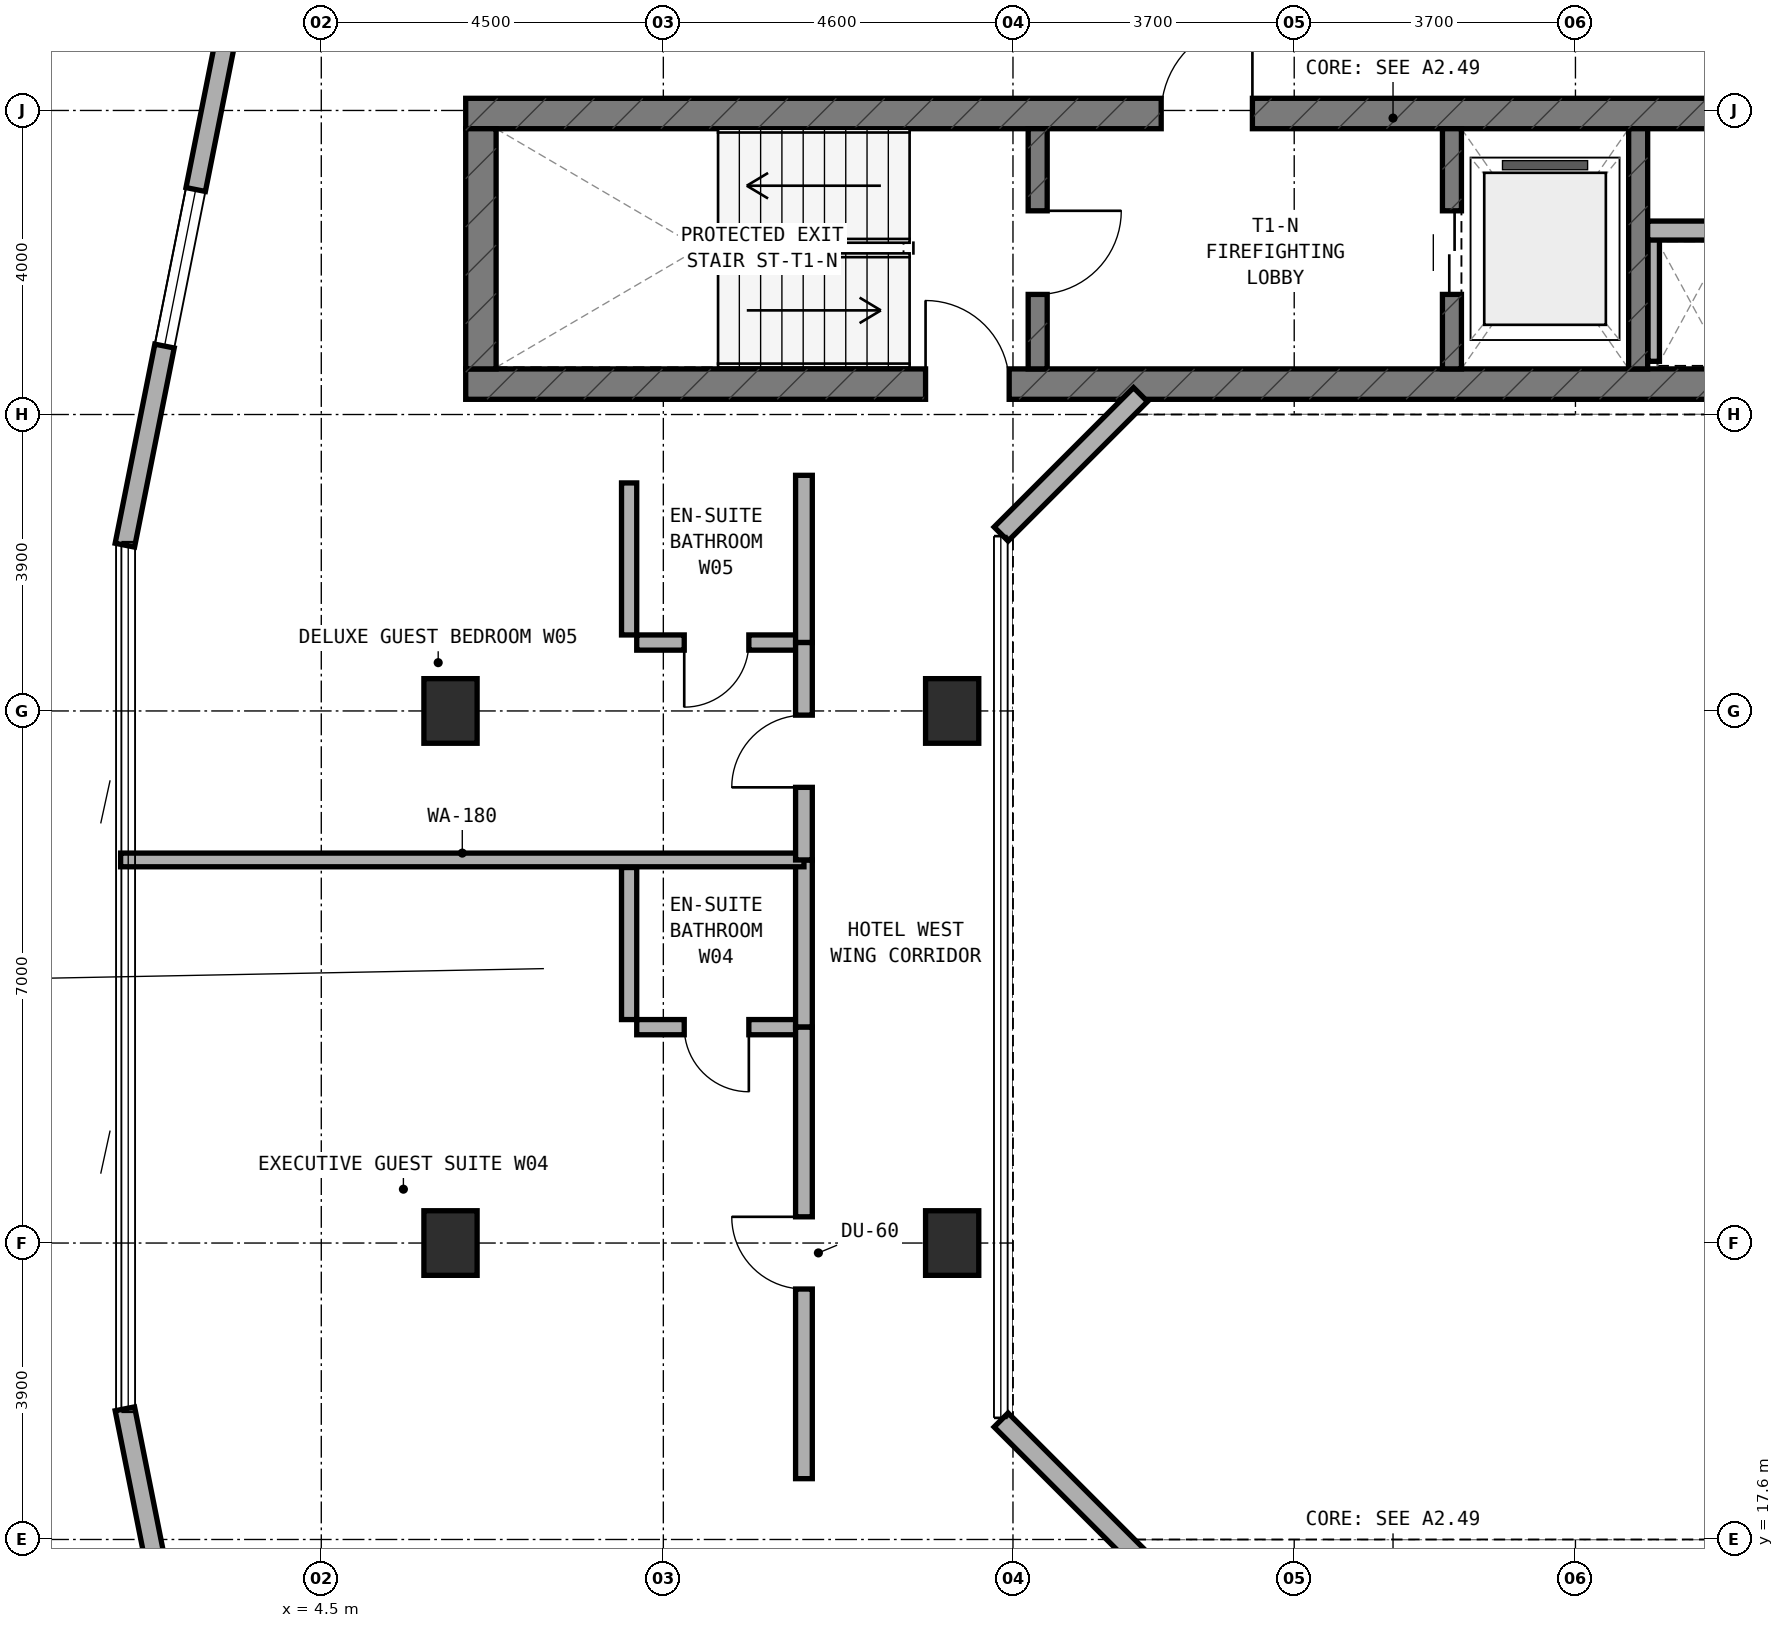
"""IFC4 building model, lengths in metres.
Left out: names, types, materials, properties, quantities, classifications, styles, units other than length and angle.
Written with IfcOpenShell. Run it as: python <this file> out.ifc"""

import sys

from ifc_helpers import new_model, si_unit, direction, frame, frame_2d, origin, origin_2d, place, context, subcontext, project, spatial, rectangle, extrude, element, fill, save


model = new_model("IFC4")
c1 = context("Model", 3, precision=1e-05, world=origin(), true_north=direction((0.0, 1.0)))
c2 = subcontext(c1, "Body", "Model", "MODEL_VIEW")
j1 = project(units=[si_unit("LENGTHUNIT", "METRE"), si_unit("PLANEANGLEUNIT", "RADIAN")], contexts=[c1])
p1 = place(None, origin())
s1 = spatial("IfcSite", under=j1, at=p1, CompositionType="ELEMENT")
p2 = place(p1, origin())
s2 = spatial("IfcBuilding", under=s1, at=p2, CompositionType="ELEMENT")
p3 = place(p2, frame((0.0, 0.0, 231.5)))
s3 = spatial("IfcBuildingStorey", under=s2, at=p3, CompositionType="ELEMENT", Elevation=231.5)
p4 = place(p3, frame((6.4, 32.8, 0.0), z_axis=(0.0, 0.0, 1.0), x_axis=(1.0, 0.0, 0.0)))
e1 = element("IfcWall", 1, at=p4, inside=s3, PredefinedType="SHEAR", context=c2, shape_type="SweptSolid", body=[
    extrude(rectangle(XDim=24.4, YDim=0.4, at=frame_2d((12.2, 0.0))), origin(), (0.0, 0.0, 1.0), 3.6),
])
p5 = place(p4, frame((6.05, 0.0, 0.0)))
e2 = element("IfcOpeningElement", 2, at=p5, cuts=e1, PredefinedType="OPENING", context=c2, shape_type="SweptSolid", body=[
    extrude(rectangle(XDim=1.1, YDim=2.15, at=frame_2d((0.55, 1.075))), frame((0.0, 0.21, 0.0), z_axis=(0.0, -1.0, 0.0), x_axis=(1.0, 0.0, 0.0)), (0.0, 0.0, 1.0), 0.42),
])
p6 = place(p3, frame((6.4, 36.36, 0.0), z_axis=(0.0, 0.0, 1.0), x_axis=(1.0, 0.0, 0.0)))
e3 = element("IfcWall", 3, at=p6, inside=s3, PredefinedType="SHEAR", context=c2, shape_type="SweptSolid", body=[
    extrude(rectangle(XDim=24.4, YDim=0.4, at=frame_2d((12.2, 0.0))), origin(), (0.0, 0.0, 1.0), 3.6),
])
p7 = place(p6, frame((9.15, 0.0, 0.0)))
e4 = element("IfcOpeningElement", 4, at=p7, cuts=e3, PredefinedType="OPENING", context=c2, shape_type="SweptSolid", body=[
    extrude(rectangle(XDim=1.2, YDim=2.15, at=frame_2d((0.6, 1.075))), frame((0.0, 0.21, 0.0), z_axis=(0.0, -1.0, 0.0), x_axis=(1.0, 0.0, 0.0)), (0.0, 0.0, 1.0), 0.42),
])
p8 = place(p6, frame((19.2, 0.0, 0.0)))
e5 = element("IfcOpeningElement", 5, at=p8, cuts=e3, PredefinedType="OPENING", context=c2, shape_type="SweptSolid", body=[
    extrude(rectangle(XDim=0.85, YDim=2.1, at=frame_2d((0.425, 1.05))), frame((0.0, 0.21, 0.0), z_axis=(0.0, -1.0, 0.0), x_axis=(1.0, 0.0, 0.0)), (0.0, 0.0, 1.0), 0.42),
])
p9 = place(p6, frame((17.22, 0.0, 0.0)))
e6 = element("IfcOpeningElement", 6, at=p9, cuts=e3, PredefinedType="OPENING", context=c2, shape_type="SweptSolid", body=[
    extrude(rectangle(XDim=0.85, YDim=2.1, at=frame_2d((0.425, 1.05))), frame((0.0, 0.21, 0.0), z_axis=(0.0, -1.0, 0.0), x_axis=(1.0, 0.0, 0.0)), (0.0, 0.0, 1.0), 0.42),
])
p10 = place(p3, frame((6.6, 33.0, 0.0), z_axis=(0.0, 0.0, 1.0), x_axis=(0.0, 1.0, 0.0)))
e7 = element("IfcWall", 7, at=p10, inside=s3, PredefinedType="SHEAR", context=c2, shape_type="SweptSolid", body=[
    extrude(rectangle(XDim=3.16, YDim=0.4, at=frame_2d((1.58, 0.0))), origin(), (0.0, 0.0, 1.0), 3.6),
])
p11 = place(p3, frame((13.925, 33.0, 0.0), z_axis=(0.0, 0.0, 1.0), x_axis=(0.0, 1.0, 0.0)))
e8 = element("IfcWall", 8, at=p11, inside=s3, PredefinedType="STANDARD", context=c2, shape_type="SweptSolid", body=[
    extrude(rectangle(XDim=3.16, YDim=0.25, at=frame_2d((1.58, 0.0))), origin(), (0.0, 0.0, 1.0), 3.32),
])
p12 = place(p11, frame((0.98, 0.0, 0.0)))
e9 = element("IfcOpeningElement", 9, at=p12, cuts=e8, PredefinedType="OPENING", context=c2, shape_type="SweptSolid", body=[
    extrude(rectangle(XDim=1.1, YDim=2.15, at=frame_2d((0.55, 1.075))), frame((0.0, 0.135, 0.0), z_axis=(0.0, -1.0, 0.0), x_axis=(1.0, 0.0, 0.0)), (0.0, 0.0, 1.0), 0.27),
])
p13 = place(p3, frame((19.375, 33.0, 0.0), z_axis=(0.0, 0.0, 1.0), x_axis=(0.0, 1.0, 0.0)))
e10 = element("IfcWall", 10, at=p13, inside=s3, PredefinedType="STANDARD", context=c2, shape_type="SweptSolid", body=[
    extrude(rectangle(XDim=3.16, YDim=0.25, at=frame_2d((1.58, 0.0))), origin(), (0.0, 0.0, 1.0), 3.32),
])
p14 = place(p13, frame((0.98, 0.0, 0.0)))
e11 = element("IfcOpeningElement", 11, at=p14, cuts=e10, PredefinedType="OPENING", context=c2, shape_type="SweptSolid", body=[
    extrude(rectangle(XDim=1.1, YDim=2.15, at=frame_2d((0.55, 1.075))), frame((0.0, 0.135, 0.0), z_axis=(0.0, -1.0, 0.0), x_axis=(1.0, 0.0, 0.0)), (0.0, 0.0, 1.0), 0.27),
])
p15 = place(p3, frame((21.825, 33.0, 0.0), z_axis=(0.0, 0.0, 1.0), x_axis=(0.0, 1.0, 0.0)))
e12 = element("IfcWall", 12, at=p15, inside=s3, PredefinedType="STANDARD", context=c2, shape_type="SweptSolid", body=[
    extrude(rectangle(XDim=3.16, YDim=0.25, at=frame_2d((1.58, 0.0))), origin(), (0.0, 0.0, 1.0), 3.32),
])
for number, where, z_axis, x_axis in (
    (13, (6.2, 21.5, 0.0), (0.0, 0.0, 1.0), (1.0, 0.0, 0.0)),
    (14, (6.2, 28.5, 0.0), (0.0, 0.0, 1.0), (1.0, 0.0, 0.0)),
    (15, (12.8, 21.5, 0.0), (0.0, 0.0, 1.0), (1.0, 0.0, 0.0)),
    (16, (12.8, 28.5, 0.0), (0.0, 0.0, 1.0), (1.0, 0.0, 0.0)),
):
    element("IfcColumn", number, at=place(p3, frame(where, z_axis=z_axis, x_axis=x_axis)), inside=s3, PredefinedType="COLUMN", context=c2, shape_type="SweptSolid", body=[
        extrude(rectangle(XDim=0.7, YDim=0.85, at=origin_2d()), origin(), (0.0, 0.0, 1.0), 3.6),
    ])
p16 = place(p3, frame((3.629, 39.283, 0.0), z_axis=(0.0, 0.0, 1.0), x_axis=(-0.195291715883, -0.980745199176, 0.0)))
e17 = element("IfcWall", 17, at=p16, inside=s3, PredefinedType="STANDARD", context=c2, shape_type="SweptSolid", body=[
    extrude(rectangle(XDim=8.771, YDim=0.26, at=frame_2d((4.385, 0.0))), origin(), (0.0, 0.0, 1.0), 3.32),
])
p17 = place(p16, frame((4.0, 0.0, 0.85)))
e18 = element("IfcOpeningElement", 18, at=p17, cuts=e17, PredefinedType="OPENING", context=c2, shape_type="SweptSolid", body=[
    extrude(rectangle(XDim=2.1, YDim=1.5, at=frame_2d((1.05, 0.75))), frame((0.0, 0.14, 0.0), z_axis=(0.0, -1.0, 0.0), x_axis=(1.0, 0.0, 0.0)), (0.0, 0.0, 1.0), 0.28),
])
p18 = place(p3, frame((1.916, 19.319, 0.0), z_axis=(0.0, 0.0, 1.0), x_axis=(0.195291715883, -0.980745199176, 0.0)))
e19 = element("IfcWall", 19, at=p18, inside=s3, PredefinedType="STANDARD", context=c2, shape_type="SweptSolid", body=[
    extrude(rectangle(XDim=8.771, YDim=0.26, at=frame_2d((4.385, 0.0))), origin(), (0.0, 0.0, 1.0), 3.32),
])
p19 = place(p18, frame((2.67, 0.0, 0.85)))
e20 = element("IfcOpeningElement", 20, at=p19, cuts=e19, PredefinedType="OPENING", context=c2, shape_type="SweptSolid", body=[
    extrude(rectangle(XDim=2.1, YDim=1.5, at=frame_2d((1.05, 0.75))), frame((0.0, 0.14, 0.0), z_axis=(0.0, -1.0, 0.0), x_axis=(1.0, 0.0, 0.0)), (0.0, 0.0, 1.0), 0.28),
])
for number, where, z_axis, x_axis in (
    (21, (15.278, 32.662, 0.0), (0.0, 0.0, 1.0), (-0.707, -0.707, 0.0)),
    (22, (13.444, 19.172, 0.0), (0.0, 0.0, 1.0), (0.707, -0.707, 0.0)),
):
    element("IfcWall", number, at=place(p3, frame(where, z_axis=z_axis, x_axis=x_axis)), inside=s3, PredefinedType="STANDARD", context=c2, shape_type="SweptSolid", body=[
        extrude(rectangle(XDim=2.594, YDim=0.26, at=frame_2d((1.297, 0.0))), origin(), (0.0, 0.0, 1.0), 3.32),
    ])
p20 = place(p3, frame((22.03, 33.1, 0.0), z_axis=(0.0, 0.0, 1.0), x_axis=(0.0, 1.0, 0.0)))
e23 = element("IfcWall", 23, at=p20, inside=s3, PredefinedType="PARTITIONING", context=c2, shape_type="SweptSolid", body=[
    extrude(rectangle(XDim=1.62, YDim=0.15, at=frame_2d((0.81, 0.0))), origin(), (0.0, 0.0, 1.0), 3.32),
])
p21 = place(p3, frame((21.95, 34.82, 0.0), z_axis=(0.0, 0.0, 1.0), x_axis=(1.0, 0.0, 0.0)))
e24 = element("IfcWall", 24, at=p21, inside=s3, PredefinedType="SOLIDWALL", context=c2, shape_type="SweptSolid", body=[
    extrude(rectangle(XDim=1.15, YDim=0.25, at=frame_2d((0.575, 0.0))), origin(), (0.0, 0.0, 1.0), 3.32),
])
p22 = place(p3, frame((8.65, 24.34, 0.0), z_axis=(0.0, 0.0, 1.0), x_axis=(1.0, 0.0, 0.0)))
e25 = element("IfcWall", 25, at=p22, inside=s3, PredefinedType="PLUMBINGWALL", context=c2, shape_type="SweptSolid", body=[
    extrude(rectangle(XDim=2.1, YDim=0.2, at=frame_2d((1.05, 0.0))), origin(), (0.0, 0.0, 1.0), 3.32),
])
p23 = place(p22, frame((0.625, 0.0, 0.0)))
e26 = element("IfcOpeningElement", 26, at=p23, cuts=e25, PredefinedType="OPENING", context=c2, shape_type="SweptSolid", body=[
    extrude(rectangle(XDim=0.85, YDim=2.1, at=frame_2d((0.425, 1.05))), frame((0.0, 0.11, 0.0), z_axis=(0.0, -1.0, 0.0), x_axis=(1.0, 0.0, 0.0)), (0.0, 0.0, 1.0), 0.22),
])
p24 = place(p3, frame((8.55, 24.44, 0.0), z_axis=(0.0, 0.0, 1.0), x_axis=(0.0, 1.0, 0.0)))
e27 = element("IfcWall", 27, at=p24, inside=s3, PredefinedType="PLUMBINGWALL", context=c2, shape_type="SweptSolid", body=[
    extrude(rectangle(XDim=2.0, YDim=0.2, at=frame_2d((1.0, 0.0))), origin(), (0.0, 0.0, 1.0), 3.32),
])
p25 = place(p3, frame((10.85, 24.34, 0.0), z_axis=(0.0, 0.0, 1.0), x_axis=(0.0, 1.0, 0.0)))
e28 = element("IfcWall", 28, at=p25, inside=s3, PredefinedType="SOLIDWALL", context=c2, shape_type="SweptSolid", body=[
    extrude(rectangle(XDim=2.2, YDim=0.22, at=frame_2d((1.1, 0.0))), origin(), (0.0, 0.0, 1.0), 3.32),
])
p26 = place(p3, frame((10.85, 18.4, 0.0), z_axis=(0.0, 0.0, 1.0), x_axis=(0.0, 1.0, 0.0)))
e29 = element("IfcWall", 29, at=p26, inside=s3, PredefinedType="SOLIDWALL", context=c2, shape_type="SweptSolid", body=[
    extrude(rectangle(XDim=5.94, YDim=0.22, at=frame_2d((2.97, 0.0))), origin(), (0.0, 0.0, 1.0), 2.745),
])
p27 = place(p26, frame((2.495, 0.0, 0.0)))
e30 = element("IfcOpeningElement", 30, at=p27, cuts=e29, PredefinedType="OPENING", context=c2, shape_type="SweptSolid", body=[
    extrude(rectangle(XDim=0.95, YDim=2.1, at=frame_2d((0.475, 1.05))), frame((0.0, 0.12, 0.0), z_axis=(0.0, -1.0, 0.0), x_axis=(1.0, 0.0, 0.0)), (0.0, 0.0, 1.0), 0.24),
])
p28 = place(p3, frame((1.86, 26.54, 0.0), z_axis=(0.0, 0.0, 1.0), x_axis=(1.0, 0.0, 0.0)))
e31 = element("IfcWall", 31, at=p28, inside=s3, PredefinedType="SOLIDWALL", context=c2, shape_type="SweptSolid", body=[
    extrude(rectangle(XDim=8.99, YDim=0.18, at=frame_2d((4.495, 0.0))), origin(), (0.0, 0.0, 1.0), 3.015),
])
p29 = place(p3, frame((8.65, 29.4, 0.0), z_axis=(0.0, 0.0, 1.0), x_axis=(1.0, 0.0, 0.0)))
e32 = element("IfcWall", 32, at=p29, inside=s3, PredefinedType="PLUMBINGWALL", context=c2, shape_type="SweptSolid", body=[
    extrude(rectangle(XDim=2.1, YDim=0.2, at=frame_2d((1.05, 0.0))), origin(), (0.0, 0.0, 1.0), 3.32),
])
p30 = place(p29, frame((0.625, 0.0, 0.0)))
e33 = element("IfcOpeningElement", 33, at=p30, cuts=e32, PredefinedType="OPENING", context=c2, shape_type="SweptSolid", body=[
    extrude(rectangle(XDim=0.85, YDim=2.1, at=frame_2d((0.425, 1.05))), frame((0.0, 0.11, 0.0), z_axis=(0.0, -1.0, 0.0), x_axis=(1.0, 0.0, 0.0)), (0.0, 0.0, 1.0), 0.22),
])
p31 = place(p3, frame((8.55, 29.5, 0.0), z_axis=(0.0, 0.0, 1.0), x_axis=(0.0, 1.0, 0.0)))
e34 = element("IfcWall", 34, at=p31, inside=s3, PredefinedType="PLUMBINGWALL", context=c2, shape_type="SweptSolid", body=[
    extrude(rectangle(XDim=2.0, YDim=0.2, at=frame_2d((1.0, 0.0))), origin(), (0.0, 0.0, 1.0), 3.32),
])
p32 = place(p3, frame((10.85, 29.4, 0.0), z_axis=(0.0, 0.0, 1.0), x_axis=(0.0, 1.0, 0.0)))
e35 = element("IfcWall", 35, at=p32, inside=s3, PredefinedType="SOLIDWALL", context=c2, shape_type="SweptSolid", body=[
    extrude(rectangle(XDim=2.2, YDim=0.22, at=frame_2d((1.1, 0.0))), origin(), (0.0, 0.0, 1.0), 3.32),
])
p33 = place(p3, frame((10.85, 26.54, 0.0), z_axis=(0.0, 0.0, 1.0), x_axis=(0.0, 1.0, 0.0)))
e36 = element("IfcWall", 36, at=p33, inside=s3, PredefinedType="SOLIDWALL", context=c2, shape_type="SweptSolid", body=[
    extrude(rectangle(XDim=2.86, YDim=0.22, at=frame_2d((1.43, 0.0))), origin(), (0.0, 0.0, 1.0), 2.745),
])
p34 = place(p33, frame((0.955, 0.0, 0.0)))
e37 = element("IfcOpeningElement", 37, at=p34, cuts=e36, PredefinedType="OPENING", context=c2, shape_type="SweptSolid", body=[
    extrude(rectangle(XDim=0.95, YDim=2.1, at=frame_2d((0.475, 1.05))), frame((0.0, 0.12, 0.0), z_axis=(0.0, -1.0, 0.0), x_axis=(1.0, 0.0, 0.0)), (0.0, 0.0, 1.0), 0.24),
])
p35 = place(p17, origin())
e38 = element("IfcWindow", 38, at=p35, inside=s3, PartitioningType="SINGLE_PANEL", PredefinedType="WINDOW", context=c2, shape_type="SweptSolid", body=[
    extrude(rectangle(XDim=2.1, YDim=1.5, at=frame_2d((1.05, 0.75))), frame((0.0, 0.03, 0.0), z_axis=(0.0, -1.0, 0.0), x_axis=(1.0, 0.0, 0.0)), (0.0, 0.0, 1.0), 0.06),
])
fill(e18, e38)
p36 = place(p12, frame((1.1, 0.0, 0.0), z_axis=(0.0, 0.0, 1.0), x_axis=(-1.0, 0.0, 0.0)))
e39 = element("IfcDoor", 39, at=p36, inside=s3, OperationType="SINGLE_SWING_LEFT", PredefinedType="DOOR", context=c2, shape_type="SweptSolid", body=[
    extrude(rectangle(XDim=1.1, YDim=2.15, at=frame_2d((0.55, 1.075))), frame((0.0, 0.025, 0.0), z_axis=(0.0, -1.0, 0.0), x_axis=(1.0, 0.0, 0.0)), (0.0, 0.0, 1.0), 0.05),
])
fill(e9, e39)
p37 = place(p7, origin())
e40 = element("IfcDoor", 40, at=p37, inside=s3, OperationType="SINGLE_SWING_RIGHT", PredefinedType="DOOR", context=c2, shape_type="SweptSolid", body=[
    extrude(rectangle(XDim=1.2, YDim=2.15, at=frame_2d((0.6, 1.075))), frame((0.0, 0.025, 0.0), z_axis=(0.0, -1.0, 0.0), x_axis=(1.0, 0.0, 0.0)), (0.0, 0.0, 1.0), 0.05),
])
fill(e4, e40)
p38 = place(p14, origin())
e41 = element("IfcDoor", 41, at=p38, inside=s3, OperationType="DOUBLE_DOOR_SLIDING", PredefinedType="DOOR", context=c2, shape_type="SweptSolid", body=[
    extrude(rectangle(XDim=1.1, YDim=2.15, at=frame_2d((0.55, 1.075))), frame((0.0, 0.025, 0.0), z_axis=(0.0, -1.0, 0.0), x_axis=(1.0, 0.0, 0.0)), (0.0, 0.0, 1.0), 0.05),
])
fill(e11, e41)
p39 = place(p5, origin())
e42 = element("IfcDoor", 42, at=p39, inside=s3, OperationType="SINGLE_SWING_LEFT", PredefinedType="DOOR", context=c2, shape_type="SweptSolid", body=[
    extrude(rectangle(XDim=1.1, YDim=2.15, at=frame_2d((0.55, 1.075))), frame((0.0, 0.025, 0.0), z_axis=(0.0, -1.0, 0.0), x_axis=(1.0, 0.0, 0.0)), (0.0, 0.0, 1.0), 0.05),
])
fill(e2, e42)
p40 = place(p23, frame((0.85, 0.0, 0.0), z_axis=(0.0, 0.0, 1.0), x_axis=(-1.0, 0.0, 0.0)))
e43 = element("IfcDoor", 43, at=p40, inside=s3, OperationType="SINGLE_SWING_LEFT", PredefinedType="DOOR", context=c2, shape_type="SweptSolid", body=[
    extrude(rectangle(XDim=0.85, YDim=2.1, at=frame_2d((0.425, 1.05))), frame((0.0, 0.025, 0.0), z_axis=(0.0, -1.0, 0.0), x_axis=(1.0, 0.0, 0.0)), (0.0, 0.0, 1.0), 0.05),
])
fill(e26, e43)
p41 = place(p27, origin())
e44 = element("IfcDoor", 44, at=p41, inside=s3, OperationType="SINGLE_SWING_RIGHT", PredefinedType="DOOR", context=c2, shape_type="SweptSolid", body=[
    extrude(rectangle(XDim=0.95, YDim=2.1, at=frame_2d((0.475, 1.05))), frame((0.0, 0.025, 0.0), z_axis=(0.0, -1.0, 0.0), x_axis=(1.0, 0.0, 0.0)), (0.0, 0.0, 1.0), 0.05),
])
fill(e30, e44)
p42 = place(p30, frame((0.85, 0.0, 0.0), z_axis=(0.0, 0.0, 1.0), x_axis=(-1.0, 0.0, 0.0)))
e45 = element("IfcDoor", 45, at=p42, inside=s3, OperationType="SINGLE_SWING_RIGHT", PredefinedType="DOOR", context=c2, shape_type="SweptSolid", body=[
    extrude(rectangle(XDim=0.85, YDim=2.1, at=frame_2d((0.425, 1.05))), frame((0.0, 0.025, 0.0), z_axis=(0.0, -1.0, 0.0), x_axis=(1.0, 0.0, 0.0)), (0.0, 0.0, 1.0), 0.05),
])
fill(e33, e45)
p43 = place(p34, origin())
e46 = element("IfcDoor", 46, at=p43, inside=s3, OperationType="SINGLE_SWING_LEFT", PredefinedType="DOOR", context=c2, shape_type="SweptSolid", body=[
    extrude(rectangle(XDim=0.95, YDim=2.1, at=frame_2d((0.475, 1.05))), frame((0.0, 0.025, 0.0), z_axis=(0.0, -1.0, 0.0), x_axis=(1.0, 0.0, 0.0)), (0.0, 0.0, 1.0), 0.05),
])
fill(e37, e46)
save(model, sys.argv[1])
